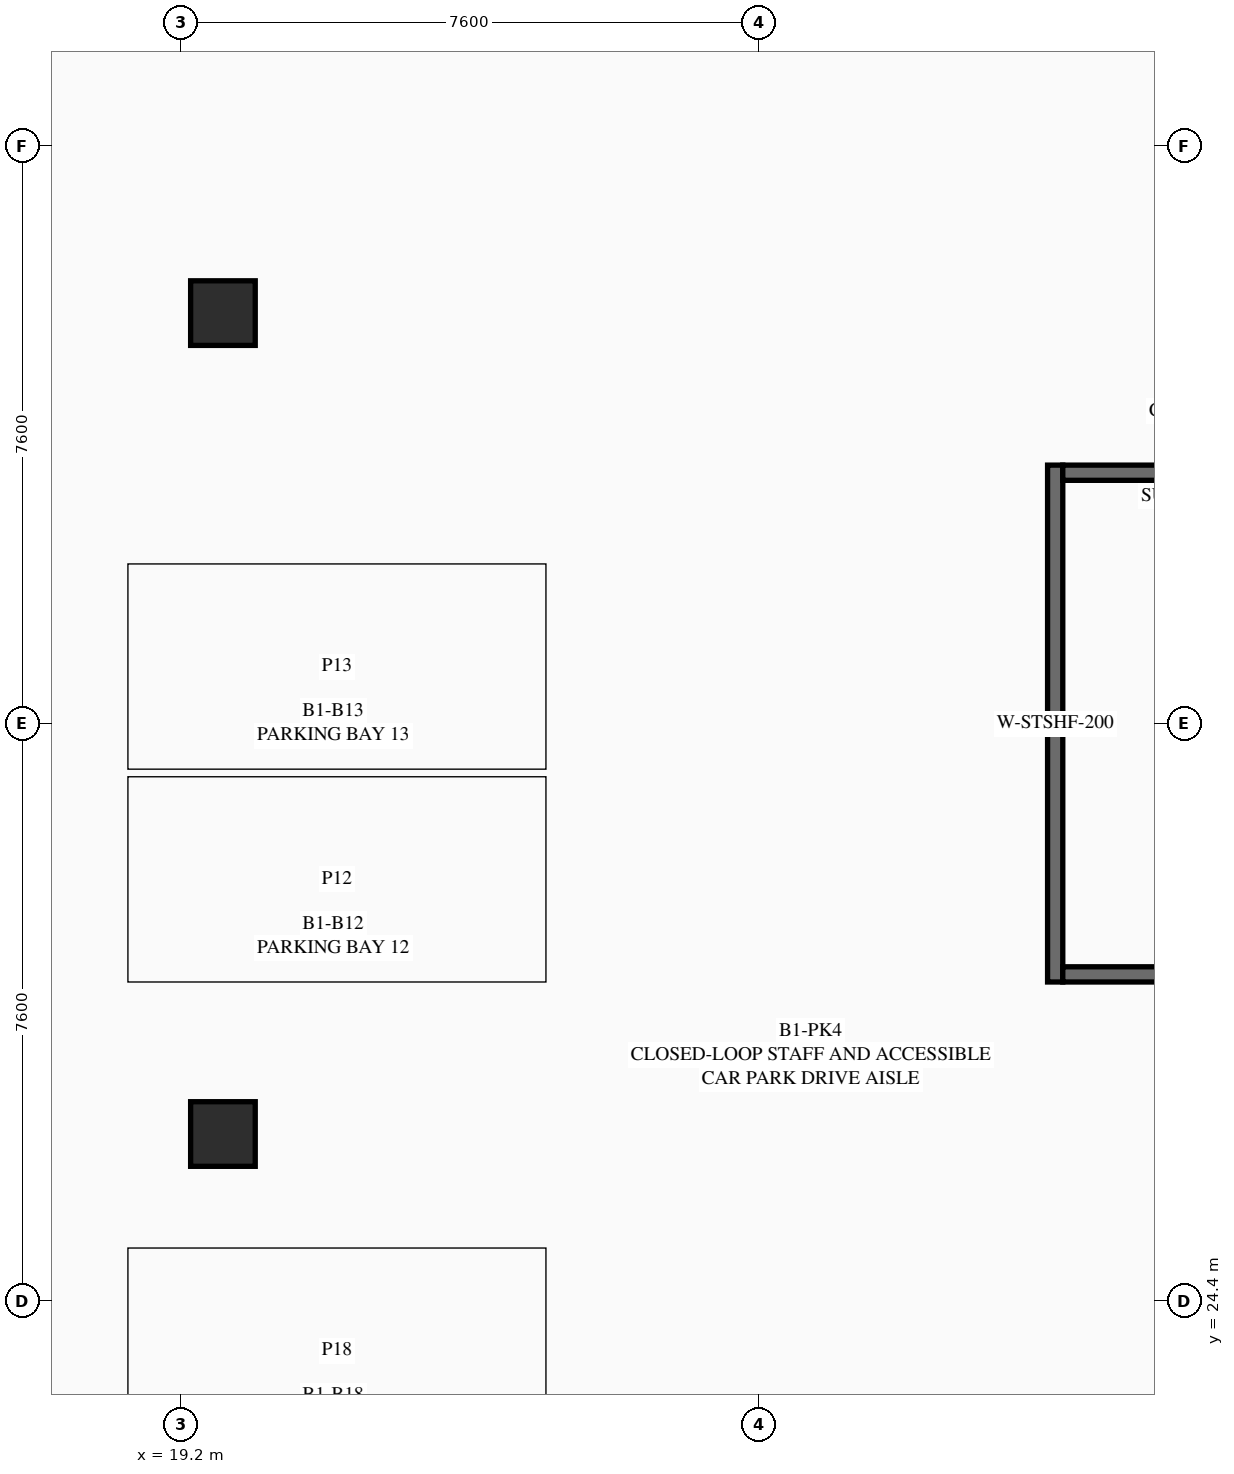
"""IFC4 building model, lengths in metres.
Left out: names, types, materials, properties, quantities, classifications, styles, units other than length and angle.
Written with IfcOpenShell. Run it as: python <this file> out.ifc"""

import sys

from ifc_helpers import new_model, si_unit, direction, frame, frame_2d, origin, origin_2d, place, context, subcontext, project, spatial, rectangle, hollow_rectangle, extrude, element, save


model = new_model("IFC4")
c1 = context("Model", 3, precision=1e-05, world=origin(), true_north=direction((0.0, 1.0)))
c2 = subcontext(c1, "Body", "Model", "MODEL_VIEW")
j1 = project(units=[si_unit("LENGTHUNIT", "METRE"), si_unit("PLANEANGLEUNIT", "RADIAN")], contexts=[c1])
p1 = place(None, origin())
s1 = spatial("IfcSite", under=j1, at=p1, CompositionType="ELEMENT")
p2 = place(p1, origin())
s2 = spatial("IfcBuilding", under=s1, at=p2, CompositionType="ELEMENT")
p3 = place(p2, frame((0.0, 0.0, -5.5)))
s3 = spatial("IfcBuildingStorey", under=s2, at=p3, CompositionType="ELEMENT", Elevation=-5.5)
for number, where, z_axis, x_axis in (
    (1, (19.75, 37.4, 0.0), (0.0, 0.0, 1.0), (1.0, 0.0, 0.0)),
    (2, (19.75, 26.6, 0.0), (0.0, 0.0, 1.0), (1.0, 0.0, 0.0)),
):
    element("IfcColumn", number, at=place(p3, frame(where, z_axis=z_axis, x_axis=x_axis)), inside=s3, PredefinedType="COLUMN", context=c2, shape_type="SweptSolid", body=[
        extrude(hollow_rectangle(XDim=0.85, YDim=0.85, WallThickness=0.035, at=origin_2d()), origin(), (0.0, 0.0, 1.0), 5.2),
    ])
p4 = place(p3, frame((30.7, 28.6, 0.0), z_axis=(0.0, 0.0, 1.0), x_axis=(0.0, 1.0, 0.0)))
e3 = element("IfcWall", 3, at=p4, inside=s3, PredefinedType="SHEAR", context=c2, shape_type="SweptSolid", body=[
    extrude(rectangle(XDim=6.8, YDim=0.2, at=frame_2d((3.4, 0.0))), origin(), (0.0, 0.0, 1.0), 5.2),
])
for number, where, z_axis, x_axis in (
    (4, (30.8, 35.3, 0.0), (0.0, 0.0, 1.0), (1.0, 0.0, 0.0)),
    (5, (30.8, 28.7, 0.0), (0.0, 0.0, 1.0), (1.0, 0.0, 0.0)),
):
    element("IfcWall", number, at=place(p3, frame(where, z_axis=z_axis, x_axis=x_axis)), inside=s3, PredefinedType="SHEAR", context=c2, shape_type="SweptSolid", body=[
        extrude(rectangle(XDim=3.4, YDim=0.2, at=frame_2d((1.7, 0.0))), origin(), (0.0, 0.0, 1.0), 5.2),
    ])
save(model, sys.argv[1])
